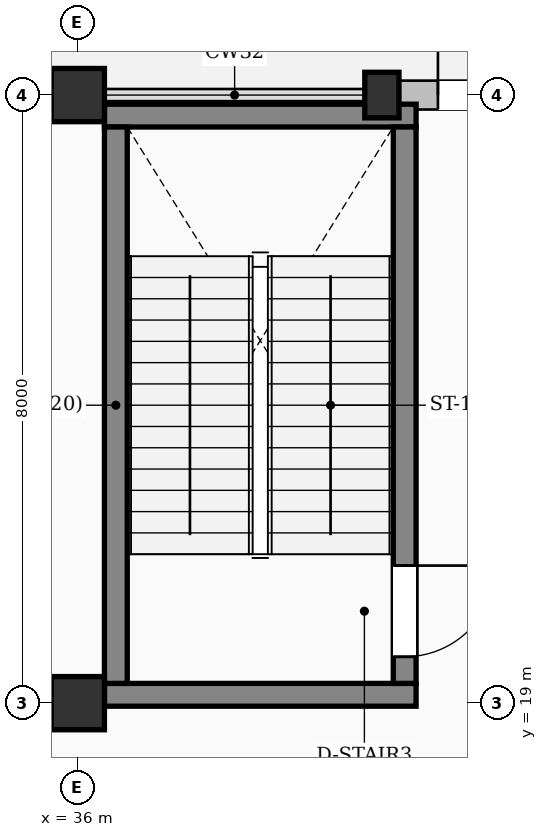
"""IFC4 building model, lengths in metres.
Left out: names, types, materials, properties, quantities, classifications, styles, units other than length and angle.
Written with IfcOpenShell. Run it as: python <this file> out.ifc"""

import sys

from ifc_helpers import new_model, si_unit, direction, frame, frame_2d, origin, origin_2d, place, context, subcontext, project, spatial, rectangle, extrude, element, fill, save


model = new_model("IFC4")
c1 = context("Model", 3, precision=1e-05, world=origin(), true_north=direction((0.0, 1.0)))
c2 = subcontext(c1, "Body", "Model", "MODEL_VIEW")
j1 = project(units=[si_unit("LENGTHUNIT", "METRE"), si_unit("PLANEANGLEUNIT", "RADIAN")], contexts=[c1])
p1 = place(None, origin())
s1 = spatial("IfcSite", under=j1, at=p1, CompositionType="ELEMENT")
p2 = place(p1, origin())
s2 = spatial("IfcBuilding", under=s1, at=p2, CompositionType="ELEMENT")
p3 = place(p2, origin())
s3 = spatial("IfcBuildingStorey", under=s2, at=p3, CompositionType="ELEMENT", Elevation=0.0)
for number, where, z_axis, x_axis in (
    (1, (36.0, 19.0, 0.0), (0.0, 0.0, 1.0), (1.0, 0.0, 0.0)),
    (2, (36.0, 27.0, 0.0), (0.0, 0.0, 1.0), (1.0, 0.0, 0.0)),
):
    element("IfcColumn", number, at=place(p3, frame(where, z_axis=z_axis, x_axis=x_axis)), inside=s3, PredefinedType="COLUMN", context=c2, shape_type="SweptSolid", body=[
        extrude(rectangle(XDim=0.7, YDim=0.7, at=origin_2d()), origin(), (0.0, 0.0, 1.0), 4.8),
    ])
p4 = place(p3, frame((40.0, 27.0, 0.0), z_axis=(0.0, 0.0, 1.0), x_axis=(1.0, 0.0, 0.0)))
e3 = element("IfcColumn", 3, at=p4, inside=s3, PredefinedType="PILASTER", context=c2, shape_type="SweptSolid", body=[
    extrude(rectangle(XDim=0.45, YDim=0.6, at=origin_2d()), origin(), (0.0, 0.0, 1.0), 4.8),
])
p5 = place(p3, frame((40.225, 27.0, 0.0), z_axis=(0.0, 0.0, 1.0), x_axis=(1.0, 0.0, 0.0)))
e4 = element("IfcWall", 4, at=p5, inside=s3, PredefinedType="SOLIDWALL", context=c2, shape_type="SweptSolid", body=[
    extrude(rectangle(XDim=3.425, YDim=0.38, at=frame_2d((1.712, 0.0))), origin(), (0.0, 0.0, 1.0), 3.985),
])
p6 = place(p5, frame((0.512, 0.0, 0.0)))
e5 = element("IfcOpeningElement", 5, at=p6, cuts=e4, PredefinedType="OPENING", context=c2, shape_type="SweptSolid", body=[
    extrude(rectangle(XDim=2.4, YDim=2.4, at=frame_2d((1.2, 1.2))), frame((0.0, 0.2, 0.0), z_axis=(0.0, -1.0, 0.0), x_axis=(1.0, 0.0, 0.0)), (0.0, 0.0, 1.0), 0.4),
])
for number, where, z_axis, x_axis in (
    (6, (36.35, 19.11, 0.0), (0.0, 0.0, 1.0), (1.0, 0.0, 0.0)),
    (7, (40.45, 26.73, 0.0), (0.0, 0.0, 1.0), (-1.0, 0.0, 0.0)),
):
    element("IfcWall", number, at=place(p3, frame(where, z_axis=z_axis, x_axis=x_axis)), inside=s3, PredefinedType="SHEAR", context=c2, shape_type="SweptSolid", body=[
        extrude(rectangle(XDim=4.1, YDim=0.3, at=frame_2d((2.05, 0.0))), origin(), (0.0, 0.0, 1.0), 4.55),
    ])
p7 = place(p3, frame((36.5, 19.26, 0.0), z_axis=(0.0, 0.0, 1.0), x_axis=(0.0, 1.0, 0.0)))
e8 = element("IfcWall", 8, at=p7, inside=s3, PredefinedType="SHEAR", context=c2, shape_type="SweptSolid", body=[
    extrude(rectangle(XDim=7.32, YDim=0.3, at=frame_2d((3.66, 0.0))), origin(), (0.0, 0.0, 1.0), 4.55),
])
p8 = place(p3, frame((40.3, 26.58, 0.0), z_axis=(0.0, 0.0, 1.0), x_axis=(0.0, -1.0, 0.0)))
e9 = element("IfcWall", 9, at=p8, inside=s3, PredefinedType="SHEAR", context=c2, shape_type="SweptSolid", body=[
    extrude(rectangle(XDim=7.32, YDim=0.3, at=frame_2d((3.66, 0.0))), origin(), (0.0, 0.0, 1.0), 4.55),
])
p9 = place(p8, frame((5.77, 0.0, 0.0)))
e10 = element("IfcOpeningElement", 10, at=p9, cuts=e9, PredefinedType="OPENING", context=c2, shape_type="SweptSolid", body=[
    extrude(rectangle(XDim=1.2, YDim=2.15, at=frame_2d((0.6, 1.075))), frame((0.0, 0.16, 0.0), z_axis=(0.0, -1.0, 0.0), x_axis=(1.0, 0.0, 0.0)), (0.0, 0.0, 1.0), 0.32),
])
p10 = place(p6, origin())
e11 = element("IfcDoor", 11, at=p10, inside=s3, OperationType="DOUBLE_DOOR_SINGLE_SWING", PredefinedType="DOOR", context=c2, shape_type="SweptSolid", body=[
    extrude(rectangle(XDim=2.4, YDim=2.4, at=frame_2d((1.2, 1.2))), frame((0.0, 0.025, 0.0), z_axis=(0.0, -1.0, 0.0), x_axis=(1.0, 0.0, 0.0)), (0.0, 0.0, 1.0), 0.05),
])
fill(e5, e11)
p11 = place(p9, origin())
e12 = element("IfcDoor", 12, at=p11, inside=s3, OperationType="SINGLE_SWING_LEFT", PredefinedType="DOOR", context=c2, shape_type="SweptSolid", body=[
    extrude(rectangle(XDim=1.2, YDim=2.15, at=frame_2d((0.6, 1.075))), frame((0.0, 0.025, 0.0), z_axis=(0.0, -1.0, 0.0), x_axis=(1.0, 0.0, 0.0)), (0.0, 0.0, 1.0), 0.05),
])
fill(e10, e12)
save(model, sys.argv[1])
